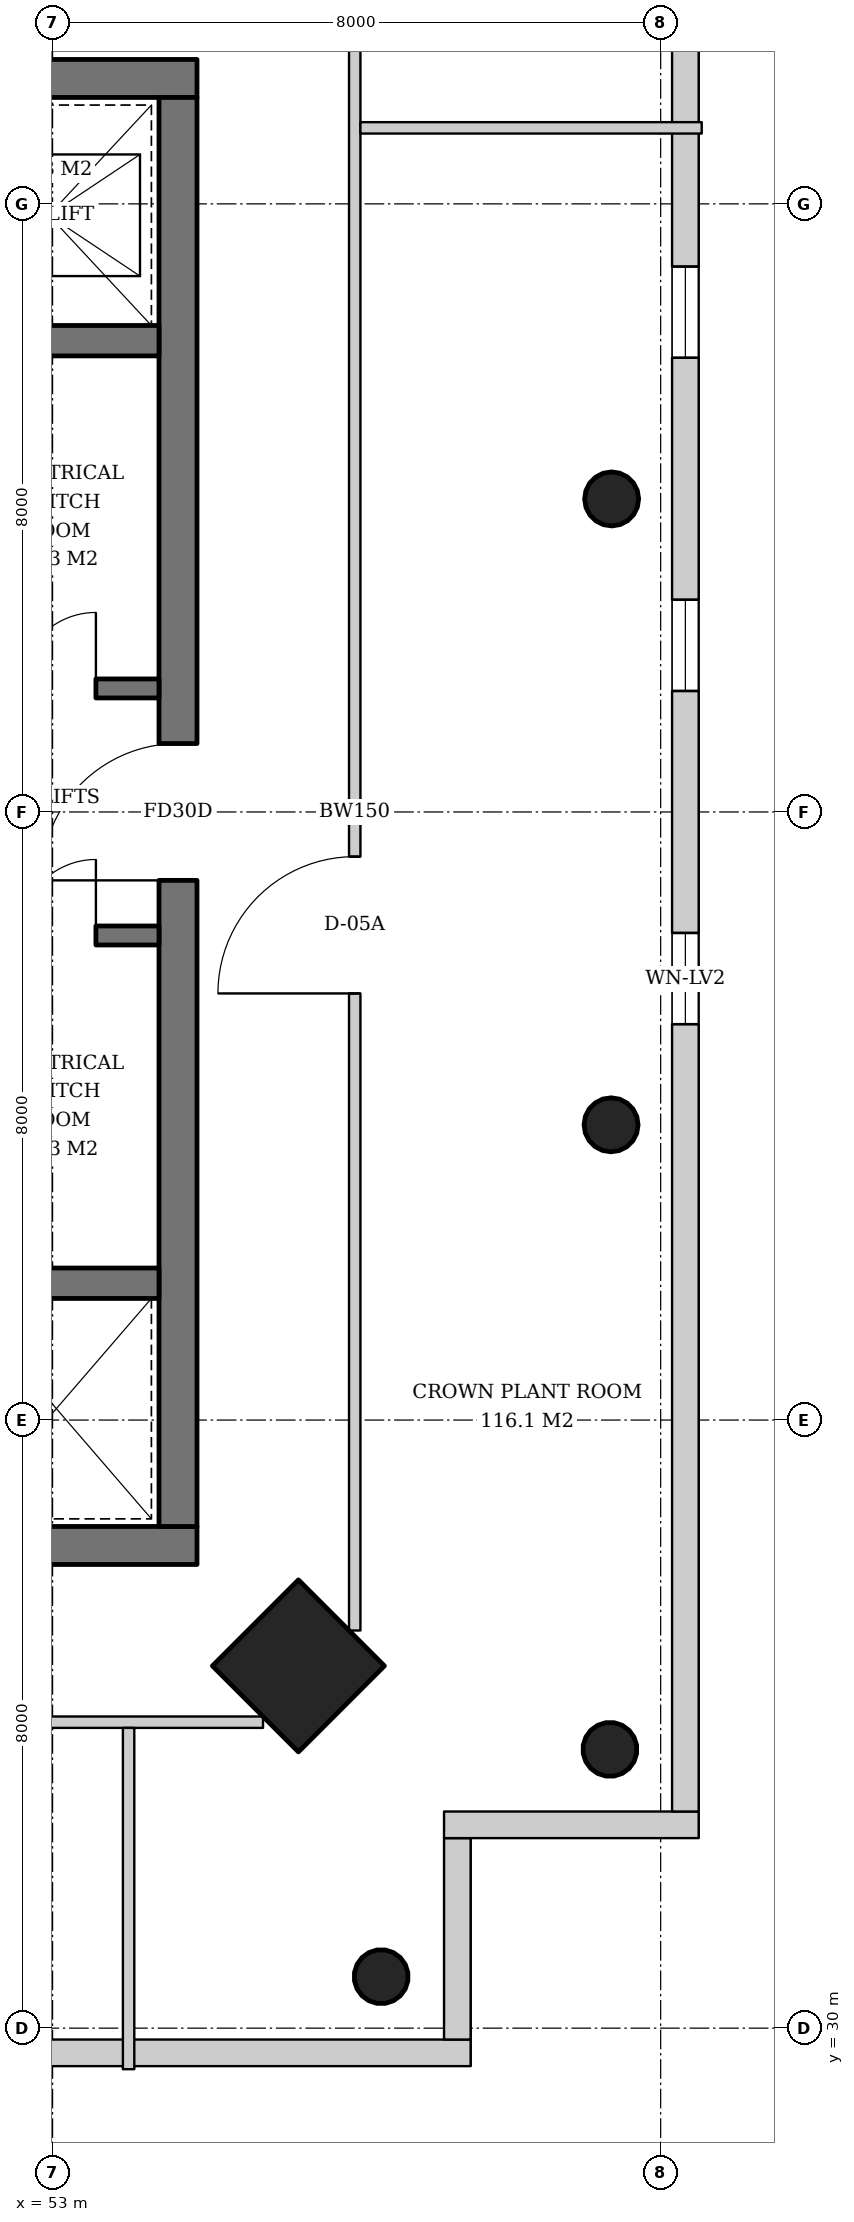
"""IFC4 building model, lengths in metres.
Left out: names, types, materials, properties, quantities, classifications, styles, units other than length and angle.
Written with IfcOpenShell. Run it as: python <this file> out.ifc"""

import sys

from ifc_helpers import new_model, si_unit, direction, frame, frame_2d, origin, origin_2d, place, context, subcontext, project, spatial, polyline, rectangle, hollow_circle, outline, extrude, element, fill, save


model = new_model("IFC4")
c1 = context("Model", 3, precision=1e-05, world=origin(), true_north=direction((0.0, 1.0)))
c2 = subcontext(c1, "Body", "Model", "MODEL_VIEW")
j1 = project(units=[si_unit("LENGTHUNIT", "METRE"), si_unit("PLANEANGLEUNIT", "RADIAN")], contexts=[c1])
p1 = place(None, origin())
s1 = spatial("IfcSite", under=j1, at=p1, CompositionType="ELEMENT")
p2 = place(p1, origin())
s2 = spatial("IfcBuilding", under=s1, at=p2, CompositionType="ELEMENT")
p3 = place(p2, frame((0.0, 0.0, 290.8)))
s3 = spatial("IfcBuildingStorey", under=s2, at=p3, CompositionType="ELEMENT", Elevation=290.8)
p4 = place(p3, frame((60.378, 33.622, 0.005), z_axis=(-0.038304280408, 0.038304280408, 0.998531704156), x_axis=(-0.707106781187, -0.707106781187, 0.0)))
e1 = element("IfcColumn", 1, at=p4, inside=s3, PredefinedType="COLUMN", context=c2, shape_type="SweptSolid", body=[
    extrude(hollow_circle(Radius=0.355, WallThickness=0.025, at=origin_2d()), origin(), (0.0, 0.0, 1.0), 3.168),
])
p5 = place(p3, frame((60.378, 41.874, 0.004), z_axis=(-0.025946000299, 0.00866606851, 0.999625782143), x_axis=(-0.316800238982, -0.948492281772, 0.0)))
e2 = element("IfcColumn", 2, at=p5, inside=s3, PredefinedType="COLUMN", context=c2, shape_type="SweptSolid", body=[
    extrude(hollow_circle(Radius=0.355, WallThickness=0.025, at=origin_2d()), origin(), (0.0, 0.0, 1.0), 4.677),
])
p6 = place(p3, frame((60.378, 50.126, 0.008), z_axis=(-0.019623775422, -0.00655441996, 0.9997859506), x_axis=(0.316800238982, -0.948492281772, 0.0)))
e3 = element("IfcColumn", 3, at=p6, inside=s3, PredefinedType="COLUMN", context=c2, shape_type="SweptSolid", body=[
    extrude(hollow_circle(Radius=0.355, WallThickness=0.025, at=origin_2d()), origin(), (0.0, 0.0, 1.0), 6.183),
])
p7 = place(p3, frame((56.278, 34.722, 0.007), z_axis=(-0.036832736785, 0.036832736785, 0.998642428), x_axis=(-0.707106781187, -0.707106781187, 0.0)))
e4 = element("IfcColumn", 4, at=p7, inside=s3, PredefinedType="COLUMN", context=c2, shape_type="SweptSolid", body=[
    extrude(rectangle(XDim=1.6, YDim=1.6, at=origin_2d()), origin(), (0.0, 0.0, 1.0), 3.288),
])
p8 = place(p3, frame((57.378, 30.622, 0.011), z_axis=(-0.046331141792, 0.046331141792, 0.99785111645), x_axis=(-0.707106781187, -0.707106781187, 0.0)))
e5 = element("IfcColumn", 5, at=p8, inside=s3, PredefinedType="COLUMN", context=c2, shape_type="SweptSolid", body=[
    extrude(hollow_circle(Radius=0.355, WallThickness=0.025, at=origin_2d()), origin(), (0.0, 0.0, 1.0), 2.608),
])
p9 = place(p3, frame((35.1, 36.35, 0.0), z_axis=(0.0, 0.0, 1.0), x_axis=(1.0, 0.0, 0.0)))
e6 = element("IfcWall", 6, at=p9, inside=s3, PredefinedType="SHEAR", context=c2, shape_type="SweptSolid", body=[
    extrude(rectangle(XDim=19.8, YDim=0.5, at=frame_2d((9.9, 0.0))), origin(), (0.0, 0.0, 1.0), 3.67),
])
p10 = place(p9, frame((3.9, 0.0, 0.0)))
e7 = element("IfcOpeningElement", 7, at=p10, cuts=e6, PredefinedType="OPENING", context=c2, shape_type="SweptSolid", body=[
    extrude(rectangle(XDim=1.0, YDim=2.1, at=frame_2d((0.5, 1.05))), frame((0.0, 0.26, 0.0), z_axis=(0.0, -1.0, 0.0), x_axis=(1.0, 0.0, 0.0)), (0.0, 0.0, 1.0), 0.52),
])
p11 = place(p9, frame((15.35, 0.0, 0.0)))
e8 = element("IfcOpeningElement", 8, at=p11, cuts=e6, PredefinedType="OPENING", context=c2, shape_type="SweptSolid", body=[
    extrude(rectangle(XDim=1.0, YDim=2.1, at=frame_2d((0.5, 1.05))), frame((0.0, 0.26, 0.0), z_axis=(0.0, -1.0, 0.0), x_axis=(1.0, 0.0, 0.0)), (0.0, 0.0, 1.0), 0.52),
])
p12 = place(p3, frame((35.1, 55.65, 0.0), z_axis=(0.0, 0.0, 1.0), x_axis=(1.0, 0.0, 0.0)))
e9 = element("IfcWall", 9, at=p12, inside=s3, PredefinedType="SHEAR", context=c2, shape_type="SweptSolid", body=[
    extrude(rectangle(XDim=19.8, YDim=0.5, at=frame_2d((9.9, 0.0))), origin(), (0.0, 0.0, 1.0), 7.238),
])
p13 = place(p12, frame((14.54, 0.0, 0.0)))
e10 = element("IfcOpeningElement", 10, at=p13, cuts=e9, PredefinedType="OPENING", context=c2, shape_type="SweptSolid", body=[
    extrude(rectangle(XDim=1.0, YDim=2.1, at=frame_2d((0.5, 1.05))), frame((0.0, 0.26, 0.0), z_axis=(0.0, -1.0, 0.0), x_axis=(1.0, 0.0, 0.0)), (0.0, 0.0, 1.0), 0.52),
])
p14 = place(p12, frame((0.865, 0.0, 0.0)))
e11 = element("IfcOpeningElement", 11, at=p14, cuts=e9, PredefinedType="OPENING", context=c2, shape_type="SweptSolid", body=[
    extrude(rectangle(XDim=1.0, YDim=2.1, at=frame_2d((0.5, 1.05))), frame((0.0, 0.26, 0.0), z_axis=(0.0, -1.0, 0.0), x_axis=(1.0, 0.0, 0.0)), (0.0, 0.0, 1.0), 0.52),
])
p15 = place(p12, frame((2.399, 0.0, 0.0)))
e12 = element("IfcOpeningElement", 12, at=p15, cuts=e9, PredefinedType="OPENING", context=c2, shape_type="SweptSolid", body=[
    extrude(rectangle(XDim=1.0, YDim=2.1, at=frame_2d((0.5, 1.05))), frame((0.0, 0.26, 0.0), z_axis=(0.0, -1.0, 0.0), x_axis=(1.0, 0.0, 0.0)), (0.0, 0.0, 1.0), 0.52),
])
p16 = place(p12, frame((3.966, 0.0, 0.0)))
e13 = element("IfcOpeningElement", 13, at=p16, cuts=e9, PredefinedType="OPENING", context=c2, shape_type="SweptSolid", body=[
    extrude(rectangle(XDim=1.0, YDim=2.1, at=frame_2d((0.5, 1.05))), frame((0.0, 0.26, 0.0), z_axis=(0.0, -1.0, 0.0), x_axis=(1.0, 0.0, 0.0)), (0.0, 0.0, 1.0), 0.52),
])
p17 = place(p3, frame((54.65, 36.6, 0.0), z_axis=(0.0, 0.0, 1.0), x_axis=(0.0, 1.0, 0.0)))
e14 = element("IfcWall", 14, at=p17, inside=s3, PredefinedType="SHEAR", context=c2, shape_type="SweptSolid", body=[
    extrude(outline(polyline([(0.0, 0.0), (18.8, 0.0), (18.8, 7.238), (0.0, 3.762), (0.0, 0.0)])), frame((0.0, 0.25, 0.0), z_axis=(0.0, -1.0, 0.0), x_axis=(1.0, 0.0, 0.0)), (0.0, 0.0, 1.0), 0.5),
])
p18 = place(p17, frame((8.5, 0.0, 0.0)))
e15 = element("IfcOpeningElement", 15, at=p18, cuts=e14, PredefinedType="OPENING", context=c2, shape_type="SweptSolid", body=[
    extrude(rectangle(XDim=1.8, YDim=2.4, at=frame_2d((0.9, 1.2))), frame((0.0, 0.26, 0.0), z_axis=(0.0, -1.0, 0.0), x_axis=(1.0, 0.0, 0.0)), (0.0, 0.0, 1.0), 0.52),
])
p19 = place(p3, frame((35.6, 39.8, 0.0), z_axis=(0.0, 0.0, 1.0), x_axis=(1.0, 0.0, 0.0)))
e16 = element("IfcWall", 16, at=p19, inside=s3, PredefinedType="SHEAR", context=c2, shape_type="SweptSolid", body=[
    extrude(rectangle(XDim=18.8, YDim=0.4, at=frame_2d((9.4, 0.0))), origin(), (0.0, 0.0, 1.0), 4.317),
])
p20 = place(p3, frame((35.6, 52.2, 0.0), z_axis=(0.0, 0.0, 1.0), x_axis=(1.0, 0.0, 0.0)))
e17 = element("IfcWall", 17, at=p20, inside=s3, PredefinedType="SHEAR", context=c2, shape_type="SweptSolid", body=[
    extrude(rectangle(XDim=18.8, YDim=0.4, at=frame_2d((9.4, 0.0))), origin(), (0.0, 0.0, 1.0), 6.609),
])
p21 = place(p3, frame((31.5, 29.675, 0.0), z_axis=(0.0, 0.0, 1.0), x_axis=(1.0, 0.0, 0.0)))
e18 = element("IfcWall", 18, at=p21, inside=s3, PredefinedType="SOLIDWALL", context=c2, shape_type="SweptSolid", body=[
    extrude(rectangle(XDim=27.0, YDim=0.35, at=frame_2d((13.5, 0.0))), origin(), (0.0, 0.0, 1.0), 2.45),
])
p22 = place(p3, frame((58.325, 29.85, 0.0), z_axis=(0.0, 0.0, 1.0), x_axis=(0.0, 1.0, 0.0)))
e19 = element("IfcWall", 19, at=p22, inside=s3, PredefinedType="SOLIDWALL", context=c2, shape_type="SweptSolid", body=[
    extrude(outline(polyline([(0.0, 0.0), (2.65, 0.0), (2.65, 3.004), (0.0, 2.515), (0.0, 0.0)])), frame((0.0, 0.175, 0.0), z_axis=(0.0, -1.0, 0.0), x_axis=(1.0, 0.0, 0.0)), (0.0, 0.0, 1.0), 0.35),
])
p23 = place(p3, frame((58.15, 32.675, 0.0), z_axis=(0.0, 0.0, 1.0), x_axis=(1.0, 0.0, 0.0)))
e20 = element("IfcWall", 20, at=p23, inside=s3, PredefinedType="SOLIDWALL", context=c2, shape_type="SweptSolid", body=[
    extrude(rectangle(XDim=3.35, YDim=0.35, at=frame_2d((1.675, 0.0))), origin(), (0.0, 0.0, 1.0), 3.004),
])
p24 = place(p3, frame((61.325, 32.85, 0.0), z_axis=(0.0, 0.0, 1.0), x_axis=(0.0, 1.0, 0.0)))
e21 = element("IfcWall", 21, at=p24, inside=s3, PredefinedType="SOLIDWALL", context=c2, shape_type="SweptSolid", body=[
    extrude(outline(polyline([(0.0, 0.0), (26.3, 0.0), (26.3, 7.931), (0.0, 3.069), (0.0, 0.0)])), frame((0.0, 0.175, 0.0), z_axis=(0.0, -1.0, 0.0), x_axis=(1.0, 0.0, 0.0)), (0.0, 0.0, 1.0), 0.35),
])
p25 = place(p24, frame((10.358, 0.0, 0.6)))
e22 = element("IfcOpeningElement", 22, at=p25, cuts=e21, PredefinedType="OPENING", context=c2, shape_type="SweptSolid", body=[
    extrude(rectangle(XDim=1.2, YDim=3.4, at=frame_2d((0.6, 1.7))), frame((0.0, 0.185, 0.0), z_axis=(0.0, -1.0, 0.0), x_axis=(1.0, 0.0, 0.0)), (0.0, 0.0, 1.0), 0.37),
])
p26 = place(p24, frame((14.742, 0.0, 0.6)))
e23 = element("IfcOpeningElement", 23, at=p26, cuts=e21, PredefinedType="OPENING", context=c2, shape_type="SweptSolid", body=[
    extrude(rectangle(XDim=1.2, YDim=3.4, at=frame_2d((0.6, 1.7))), frame((0.0, 0.185, 0.0), z_axis=(0.0, -1.0, 0.0), x_axis=(1.0, 0.0, 0.0)), (0.0, 0.0, 1.0), 0.37),
])
p27 = place(p24, frame((19.125, 0.0, 0.6)))
e24 = element("IfcOpeningElement", 24, at=p27, cuts=e21, PredefinedType="OPENING", context=c2, shape_type="SweptSolid", body=[
    extrude(rectangle(XDim=1.2, YDim=3.4, at=frame_2d((0.6, 1.7))), frame((0.0, 0.185, 0.0), z_axis=(0.0, -1.0, 0.0), x_axis=(1.0, 0.0, 0.0)), (0.0, 0.0, 1.0), 0.37),
])
p28 = place(p24, frame((23.508, 0.0, 0.6)))
e25 = element("IfcOpeningElement", 25, at=p28, cuts=e21, PredefinedType="OPENING", context=c2, shape_type="SweptSolid", body=[
    extrude(rectangle(XDim=1.2, YDim=3.4, at=frame_2d((0.6, 1.7))), frame((0.0, 0.185, 0.0), z_axis=(0.0, -1.0, 0.0), x_axis=(1.0, 0.0, 0.0)), (0.0, 0.0, 1.0), 0.37),
])
p29 = place(p3, frame((48.93, 47.625, 0.0), z_axis=(0.0, 0.0, 1.0), x_axis=(1.0, 0.0, 0.0)))
e26 = element("IfcWall", 26, at=p29, inside=s3, PredefinedType="SHEAR", context=c2, shape_type="SweptSolid", body=[
    extrude(rectangle(XDim=5.47, YDim=0.25, at=frame_2d((2.735, 0.0))), origin(), (0.0, 0.0, 1.0), 5.777),
])
p30 = place(p29, frame((0.78, 0.0, 0.0)))
e27 = element("IfcOpeningElement", 27, at=p30, cuts=e26, PredefinedType="OPENING", context=c2, shape_type="SweptSolid", body=[
    extrude(rectangle(XDim=1.0, YDim=2.1, at=frame_2d((0.5, 1.05))), frame((0.0, 0.135, 0.0), z_axis=(0.0, -1.0, 0.0), x_axis=(1.0, 0.0, 0.0)), (0.0, 0.0, 1.0), 0.27),
])
p31 = place(p29, frame((3.64, 0.0, 0.0)))
e28 = element("IfcOpeningElement", 28, at=p31, cuts=e26, PredefinedType="OPENING", context=c2, shape_type="SweptSolid", body=[
    extrude(rectangle(XDim=1.0, YDim=2.1, at=frame_2d((0.5, 1.05))), frame((0.0, 0.135, 0.0), z_axis=(0.0, -1.0, 0.0), x_axis=(1.0, 0.0, 0.0)), (0.0, 0.0, 1.0), 0.27),
])
p32 = place(p3, frame((48.93, 44.375, 0.0), z_axis=(0.0, 0.0, 1.0), x_axis=(1.0, 0.0, 0.0)))
e29 = element("IfcWall", 29, at=p32, inside=s3, PredefinedType="SHEAR", context=c2, shape_type="SweptSolid", body=[
    extrude(rectangle(XDim=5.47, YDim=0.25, at=frame_2d((2.735, 0.0))), origin(), (0.0, 0.0, 1.0), 5.177),
])
p33 = place(p32, frame((0.78, 0.0, 0.0)))
e30 = element("IfcOpeningElement", 30, at=p33, cuts=e29, PredefinedType="OPENING", context=c2, shape_type="SweptSolid", body=[
    extrude(rectangle(XDim=1.0, YDim=2.1, at=frame_2d((0.5, 1.05))), frame((0.0, 0.135, 0.0), z_axis=(0.0, -1.0, 0.0), x_axis=(1.0, 0.0, 0.0)), (0.0, 0.0, 1.0), 0.27),
])
p34 = place(p32, frame((3.64, 0.0, 0.0)))
e31 = element("IfcOpeningElement", 31, at=p34, cuts=e29, PredefinedType="OPENING", context=c2, shape_type="SweptSolid", body=[
    extrude(rectangle(XDim=1.0, YDim=2.1, at=frame_2d((0.5, 1.05))), frame((0.0, 0.135, 0.0), z_axis=(0.0, -1.0, 0.0), x_axis=(1.0, 0.0, 0.0)), (0.0, 0.0, 1.0), 0.27),
])
p35 = place(p3, frame((56.975, 35.231, 0.0), z_axis=(0.0, 0.0, 1.0), x_axis=(0.0, 1.0, 0.0)))
e32 = element("IfcWall", 32, at=p35, inside=s3, PredefinedType="SOLIDWALL", context=c2, shape_type="SweptSolid", body=[
    extrude(rectangle(XDim=21.537, YDim=0.15, at=frame_2d((10.769, 0.0))), origin(), (0.0, 0.0, 1.0), 2.45),
])
p36 = place(p35, frame((8.381, 0.0, 0.0)))
e33 = element("IfcOpeningElement", 33, at=p36, cuts=e32, PredefinedType="OPENING", context=c2, shape_type="SweptSolid", body=[
    extrude(rectangle(XDim=1.8, YDim=2.35, at=frame_2d((0.9, 1.175))), frame((0.0, 0.085, 0.0), z_axis=(0.0, -1.0, 0.0), x_axis=(1.0, 0.0, 0.0)), (0.0, 0.0, 1.0), 0.17),
])
p37 = place(p3, frame((57.05, 55.0, 0.0), z_axis=(0.0, 0.0, 1.0), x_axis=(1.0, 0.0, 0.0)))
e34 = element("IfcWall", 34, at=p37, inside=s3, PredefinedType="SOLIDWALL", context=c2, shape_type="SweptSolid", body=[
    extrude(rectangle(XDim=4.49, YDim=0.15, at=frame_2d((2.245, 0.0))), origin(), (0.0, 0.0, 1.0), 2.45),
])
p38 = place(p3, frame((34.231, 34.025, 0.0), z_axis=(0.0, 0.0, 1.0), x_axis=(1.0, 0.0, 0.0)))
e35 = element("IfcWall", 35, at=p38, inside=s3, PredefinedType="SOLIDWALL", context=c2, shape_type="SweptSolid", body=[
    extrude(rectangle(XDim=21.537, YDim=0.15, at=frame_2d((10.769, 0.0))), origin(), (0.0, 0.0, 1.0), 2.45),
])
p39 = place(p38, frame((8.381, 0.0, 0.0)))
e36 = element("IfcOpeningElement", 36, at=p39, cuts=e35, PredefinedType="OPENING", context=c2, shape_type="SweptSolid", body=[
    extrude(rectangle(XDim=1.8, YDim=2.35, at=frame_2d((0.9, 1.175))), frame((0.0, 0.085, 0.0), z_axis=(0.0, -1.0, 0.0), x_axis=(1.0, 0.0, 0.0)), (0.0, 0.0, 1.0), 0.17),
])
p40 = place(p3, frame((54.0, 33.95, 0.0), z_axis=(0.0, 0.0, 1.0), x_axis=(0.0, -1.0, 0.0)))
e37 = element("IfcWall", 37, at=p40, inside=s3, PredefinedType="SOLIDWALL", context=c2, shape_type="SweptSolid", body=[
    extrude(rectangle(XDim=4.49, YDim=0.15, at=frame_2d((2.245, 0.0))), origin(), (0.0, 0.0, 1.0), 2.45),
])
p41 = place(p25, origin())
e38 = element("IfcWindow", 38, at=p41, inside=s3, PartitioningType="SINGLE_PANEL", PredefinedType="USERDEFINED", context=c2, shape_type="SweptSolid", body=[
    extrude(rectangle(XDim=1.2, YDim=3.4, at=frame_2d((0.6, 1.7))), frame((0.0, 0.03, 0.0), z_axis=(0.0, -1.0, 0.0), x_axis=(1.0, 0.0, 0.0)), (0.0, 0.0, 1.0), 0.06),
])
fill(e22, e38)
p42 = place(p26, origin())
e39 = element("IfcWindow", 39, at=p42, inside=s3, PartitioningType="SINGLE_PANEL", PredefinedType="USERDEFINED", context=c2, shape_type="SweptSolid", body=[
    extrude(rectangle(XDim=1.2, YDim=3.4, at=frame_2d((0.6, 1.7))), frame((0.0, 0.03, 0.0), z_axis=(0.0, -1.0, 0.0), x_axis=(1.0, 0.0, 0.0)), (0.0, 0.0, 1.0), 0.06),
])
fill(e23, e39)
p43 = place(p27, origin())
e40 = element("IfcWindow", 40, at=p43, inside=s3, PartitioningType="SINGLE_PANEL", PredefinedType="USERDEFINED", context=c2, shape_type="SweptSolid", body=[
    extrude(rectangle(XDim=1.2, YDim=3.4, at=frame_2d((0.6, 1.7))), frame((0.0, 0.03, 0.0), z_axis=(0.0, -1.0, 0.0), x_axis=(1.0, 0.0, 0.0)), (0.0, 0.0, 1.0), 0.06),
])
fill(e24, e40)
p44 = place(p31, origin())
e41 = element("IfcDoor", 41, at=p44, inside=s3, OperationType="SINGLE_SWING_RIGHT", PredefinedType="DOOR", context=c2, shape_type="SweptSolid", body=[
    extrude(rectangle(XDim=1.0, YDim=2.1, at=frame_2d((0.5, 1.05))), frame((0.0, 0.025, 0.0), z_axis=(0.0, -1.0, 0.0), x_axis=(1.0, 0.0, 0.0)), (0.0, 0.0, 1.0), 0.05),
])
fill(e28, e41)
p45 = place(p34, origin())
e42 = element("IfcDoor", 42, at=p45, inside=s3, OperationType="SINGLE_SWING_RIGHT", PredefinedType="DOOR", context=c2, shape_type="SweptSolid", body=[
    extrude(rectangle(XDim=1.0, YDim=2.1, at=frame_2d((0.5, 1.05))), frame((0.0, 0.025, 0.0), z_axis=(0.0, -1.0, 0.0), x_axis=(1.0, 0.0, 0.0)), (0.0, 0.0, 1.0), 0.05),
])
fill(e31, e42)
p46 = place(p18, origin())
e43 = element("IfcDoor", 43, at=p46, inside=s3, OperationType="DOUBLE_DOOR_SINGLE_SWING", PredefinedType="DOOR", context=c2, shape_type="SweptSolid", body=[
    extrude(rectangle(XDim=1.8, YDim=2.4, at=frame_2d((0.9, 1.2))), frame((0.0, 0.025, 0.0), z_axis=(0.0, -1.0, 0.0), x_axis=(1.0, 0.0, 0.0)), (0.0, 0.0, 1.0), 0.05),
])
fill(e15, e43)
p47 = place(p36, origin())
e44 = element("IfcDoor", 44, at=p47, inside=s3, OperationType="DOUBLE_DOOR_SINGLE_SWING", PredefinedType="DOOR", context=c2, shape_type="SweptSolid", body=[
    extrude(rectangle(XDim=1.8, YDim=2.35, at=frame_2d((0.9, 1.175))), frame((0.0, 0.025, 0.0), z_axis=(0.0, -1.0, 0.0), x_axis=(1.0, 0.0, 0.0)), (0.0, 0.0, 1.0), 0.05),
])
fill(e33, e44)
save(model, sys.argv[1])
